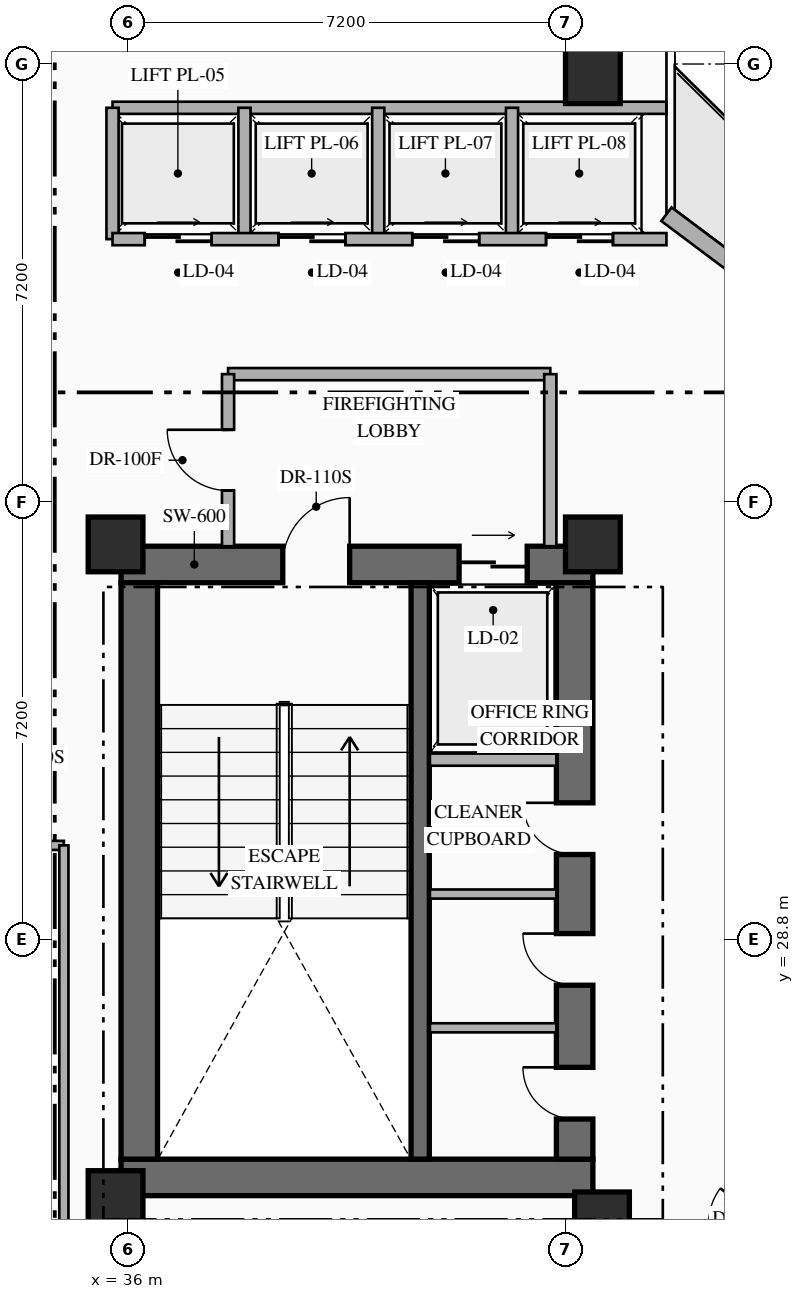
"""IFC4 building model, lengths in metres.
Left out: names, types, materials, properties, quantities, classifications, styles, units other than length and angle.
Written with IfcOpenShell. Run it as: python <this file> out.ifc"""

import sys

from ifc_helpers import new_model, si_unit, direction, frame, frame_2d, origin, origin_2d, place, context, subcontext, project, spatial, rectangle, extrude, element, fill, save


model = new_model("IFC4")
c1 = context("Model", 3, precision=1e-05, world=origin(), true_north=direction((0.0, 1.0)))
c2 = subcontext(c1, "Body", "Model", "MODEL_VIEW")
j1 = project(units=[si_unit("LENGTHUNIT", "METRE"), si_unit("PLANEANGLEUNIT", "RADIAN")], contexts=[c1])
p1 = place(None, origin())
s1 = spatial("IfcSite", under=j1, at=p1, CompositionType="ELEMENT")
p2 = place(p1, origin())
s2 = spatial("IfcBuilding", under=s1, at=p2, CompositionType="ELEMENT")
p3 = place(p2, frame((0.0, 0.0, 104.85)))
s3 = spatial("IfcBuildingStorey", under=s2, at=p3, CompositionType="ELEMENT", Elevation=104.85)
p4 = place(p3, frame((35.89, 24.89, 0.0), z_axis=(0.0, 0.0, 1.0), x_axis=(1.0, 0.0, 0.0)))
e1 = element("IfcWall", 1, at=p4, inside=s3, PredefinedType="SHEAR", context=c2, shape_type="SweptSolid", body=[
    extrude(rectangle(XDim=7.76, YDim=0.6, at=frame_2d((3.88, 0.0))), origin(), (0.0, 0.0, 1.0), 3.6),
])
p5 = place(p3, frame((35.89, 34.97, 0.0), z_axis=(0.0, 0.0, 1.0), x_axis=(1.0, 0.0, 0.0)))
e2 = element("IfcWall", 2, at=p5, inside=s3, PredefinedType="SHEAR", context=c2, shape_type="SweptSolid", body=[
    extrude(rectangle(XDim=7.76, YDim=0.6, at=frame_2d((3.88, 0.0))), origin(), (0.0, 0.0, 1.0), 3.6),
])
p6 = place(p5, frame((2.66, 0.0, 0.0)))
e3 = element("IfcOpeningElement", 3, at=p6, cuts=e2, PredefinedType="OPENING", context=c2, shape_type="SweptSolid", body=[
    extrude(rectangle(XDim=1.1, YDim=2.2, at=frame_2d((0.55, 1.1))), frame((0.0, 0.31, 0.0), z_axis=(0.0, -1.0, 0.0), x_axis=(1.0, 0.0, 0.0)), (0.0, 0.0, 1.0), 0.62),
])
p7 = place(p5, frame((5.56, 0.0, 0.0)))
e4 = element("IfcOpeningElement", 4, at=p7, cuts=e2, PredefinedType="OPENING", context=c2, shape_type="SweptSolid", body=[
    extrude(rectangle(XDim=1.12, YDim=2.15, at=frame_2d((0.56, 1.075))), frame((0.0, 0.31, 0.0), z_axis=(0.0, -1.0, 0.0), x_axis=(1.0, 0.0, 0.0)), (0.0, 0.0, 1.0), 0.62),
])
p8 = place(p3, frame((36.19, 25.19, 0.0), z_axis=(0.0, 0.0, 1.0), x_axis=(0.0, 1.0, 0.0)))
e5 = element("IfcWall", 5, at=p8, inside=s3, PredefinedType="SHEAR", context=c2, shape_type="SweptSolid", body=[
    extrude(rectangle(XDim=9.48, YDim=0.6, at=frame_2d((4.74, 0.0))), origin(), (0.0, 0.0, 1.0), 3.6),
])
p9 = place(p3, frame((43.35, 25.19, 0.0), z_axis=(0.0, 0.0, 1.0), x_axis=(0.0, 1.0, 0.0)))
e6 = element("IfcWall", 6, at=p9, inside=s3, PredefinedType="SHEAR", context=c2, shape_type="SweptSolid", body=[
    extrude(rectangle(XDim=9.48, YDim=0.6, at=frame_2d((4.74, 0.0))), origin(), (0.0, 0.0, 1.0), 3.6),
])
p10 = place(p9, frame((0.66, 0.0, 0.0)))
e7 = element("IfcOpeningElement", 7, at=p10, cuts=e6, PredefinedType="OPENING", context=c2, shape_type="SweptSolid", body=[
    extrude(rectangle(XDim=0.85, YDim=2.08, at=frame_2d((0.425, 1.04))), frame((0.0, 0.31, 0.0), z_axis=(0.0, -1.0, 0.0), x_axis=(1.0, 0.0, 0.0)), (0.0, 0.0, 1.0), 0.62),
])
p11 = place(p9, frame((2.86, 0.0, 0.0)))
e8 = element("IfcOpeningElement", 8, at=p11, cuts=e6, PredefinedType="OPENING", context=c2, shape_type="SweptSolid", body=[
    extrude(rectangle(XDim=0.85, YDim=2.08, at=frame_2d((0.425, 1.04))), frame((0.0, 0.31, 0.0), z_axis=(0.0, -1.0, 0.0), x_axis=(1.0, 0.0, 0.0)), (0.0, 0.0, 1.0), 0.62),
])
p12 = place(p9, frame((5.01, 0.0, 0.0)))
e9 = element("IfcOpeningElement", 9, at=p12, cuts=e6, PredefinedType="OPENING", context=c2, shape_type="SweptSolid", body=[
    extrude(rectangle(XDim=0.85, YDim=2.08, at=frame_2d((0.425, 1.04))), frame((0.0, 0.31, 0.0), z_axis=(0.0, -1.0, 0.0), x_axis=(1.0, 0.0, 0.0)), (0.0, 0.0, 1.0), 0.62),
])
p13 = place(p3, frame((40.81, 25.19, 0.0), z_axis=(0.0, 0.0, 1.0), x_axis=(0.0, 1.0, 0.0)))
e10 = element("IfcWall", 10, at=p13, inside=s3, PredefinedType="SHEAR", context=c2, shape_type="SweptSolid", body=[
    extrude(rectangle(XDim=9.48, YDim=0.3, at=frame_2d((4.74, 0.0))), origin(), (0.0, 0.0, 1.0), 3.6),
])
for number, where, z_axis, x_axis in (
    (11, (35.8, 24.55, 0.0), (0.0, 0.0, 1.0), (1.0, 0.0, 0.0)),
    (12, (43.8, 24.2, 0.0), (0.0, 0.0, 1.0), (1.0, 0.0, 0.0)),
    (13, (35.8, 35.3, 0.0), (0.0, 0.0, 1.0), (1.0, 0.0, 0.0)),
    (14, (43.65, 35.3, 0.0), (0.0, 0.0, 1.0), (1.0, 0.0, 0.0)),
    (15, (43.65, 43.0, 0.0), (0.0, 0.0, 1.0), (1.0, 0.0, 0.0)),
):
    element("IfcColumn", number, at=place(p3, frame(where, z_axis=z_axis, x_axis=x_axis)), inside=s3, PredefinedType="COLUMN", context=c2, shape_type="SweptSolid", body=[
        extrude(rectangle(XDim=0.9, YDim=0.9, at=origin_2d()), origin(), (0.0, 0.0, 1.0), 3.6),
    ])
p14 = place(p3, frame((44.86, 40.73, 0.0), z_axis=(0.0, 0.0, 1.0), x_axis=(0.800006902154, -0.599990797017, 0.0)))
e16 = element("IfcWall", 16, at=p14, inside=s3, PredefinedType="STANDARD", context=c2, shape_type="SweptSolid", body=[
    extrude(rectangle(XDim=29.712, YDim=0.28, at=frame_2d((14.856, 0.0))), origin(), (0.0, 0.0, 1.0), 3.35),
])
p15 = place(p14, frame((14.249, 0.0, 0.0)))
e17 = element("IfcOpeningElement", 17, at=p15, cuts=e16, PredefinedType="OPENING", context=c2, shape_type="SweptSolid", body=[
    extrude(rectangle(XDim=1.1, YDim=2.2, at=frame_2d((0.55, 1.1))), frame((0.0, 0.15, 0.0), z_axis=(0.0, -1.0, 0.0), x_axis=(1.0, 0.0, 0.0)), (0.0, 0.0, 1.0), 0.3),
])
p16 = place(p14, frame((6.528, 0.0, 0.85)))
e18 = element("IfcOpeningElement", 18, at=p16, cuts=e16, PredefinedType="OPENING", context=c2, shape_type="SweptSolid", body=[
    extrude(rectangle(XDim=1.8, YDim=2.1, at=frame_2d((0.9, 1.05))), frame((0.0, 0.15, 0.0), z_axis=(0.0, -1.0, 0.0), x_axis=(1.0, 0.0, 0.0)), (0.0, 0.0, 1.0), 0.3),
])
p17 = place(p14, frame((21.384, 0.0, 0.85)))
e19 = element("IfcOpeningElement", 19, at=p17, cuts=e16, PredefinedType="OPENING", context=c2, shape_type="SweptSolid", body=[
    extrude(rectangle(XDim=1.8, YDim=2.1, at=frame_2d((0.9, 1.05))), frame((0.0, 0.15, 0.0), z_axis=(0.0, -1.0, 0.0), x_axis=(1.0, 0.0, 0.0)), (0.0, 0.0, 1.0), 0.3),
])
p18 = place(p3, frame((40.97, 31.76, 0.0), z_axis=(0.0, 0.0, 1.0), x_axis=(1.0, 0.0, 0.0)))
e20 = element("IfcWall", 20, at=p18, inside=s3, PredefinedType="STANDARD", context=c2, shape_type="SweptSolid", body=[
    extrude(rectangle(XDim=2.08, YDim=0.2, at=frame_2d((1.04, 0.0))), origin(), (0.0, 0.0, 1.0), 3.35),
])
for number, where, z_axis, x_axis in (
    (21, (40.97, 27.35, 0.0), (0.0, 0.0, 1.0), (1.0, 0.0, 0.0)),
    (22, (40.97, 29.55, 0.0), (0.0, 0.0, 1.0), (1.0, 0.0, 0.0)),
):
    element("IfcWall", number, at=place(p3, frame(where, z_axis=z_axis, x_axis=x_axis)), inside=s3, PredefinedType="PARTITIONING", context=c2, shape_type="SweptSolid", body=[
        extrude(rectangle(XDim=2.08, YDim=0.15, at=frame_2d((1.04, 0.0))), origin(), (0.0, 0.0, 1.0), 3.35),
    ])
p19 = place(p3, frame((37.65, 38.1, 0.0), z_axis=(0.0, 0.0, 1.0), x_axis=(1.0, 0.0, 0.0)))
e23 = element("IfcWall", 23, at=p19, inside=s3, PredefinedType="STANDARD", context=c2, shape_type="SweptSolid", body=[
    extrude(rectangle(XDim=5.3, YDim=0.2, at=frame_2d((2.65, 0.0))), origin(), (0.0, 0.0, 1.0), 3.35),
])
p20 = place(p3, frame((42.95, 35.27, 0.0), z_axis=(0.0, 0.0, 1.0), x_axis=(0.0, 1.0, 0.0)))
e24 = element("IfcWall", 24, at=p20, inside=s3, PredefinedType="STANDARD", context=c2, shape_type="SweptSolid", body=[
    extrude(rectangle(XDim=2.83, YDim=0.2, at=frame_2d((1.415, 0.0))), origin(), (0.0, 0.0, 1.0), 3.35),
])
p21 = place(p3, frame((37.65, 35.27, 0.0), z_axis=(0.0, 0.0, 1.0), x_axis=(0.0, 1.0, 0.0)))
e25 = element("IfcWall", 25, at=p21, inside=s3, PredefinedType="STANDARD", context=c2, shape_type="SweptSolid", body=[
    extrude(rectangle(XDim=2.83, YDim=0.2, at=frame_2d((1.415, 0.0))), origin(), (0.0, 0.0, 1.0), 3.35),
])
p22 = place(p21, frame((0.915, 0.0, 0.0)))
e26 = element("IfcOpeningElement", 26, at=p22, cuts=e25, PredefinedType="OPENING", context=c2, shape_type="SweptSolid", body=[
    extrude(rectangle(XDim=1.0, YDim=2.2, at=frame_2d((0.5, 1.1))), frame((0.0, 0.11, 0.0), z_axis=(0.0, -1.0, 0.0), x_axis=(1.0, 0.0, 0.0)), (0.0, 0.0, 1.0), 0.22),
])
p23 = place(p3, frame((35.75, 42.48, 0.0), z_axis=(0.0, 0.0, 1.0), x_axis=(1.0, 0.0, 0.0)))
e27 = element("IfcWall", 27, at=p23, inside=s3, PredefinedType="STANDARD", context=c2, shape_type="SweptSolid", body=[
    extrude(rectangle(XDim=9.11, YDim=0.2, at=frame_2d((4.555, 0.0))), origin(), (0.0, 0.0, 1.0), 3.35),
])
for number, where, z_axis, x_axis in (
    (28, (35.75, 40.32, 0.0), (0.0, 0.0, 1.0), (0.0, 1.0, 0.0)),
    (29, (37.92, 40.32, 0.0), (0.0, 0.0, 1.0), (0.0, 1.0, 0.0)),
    (30, (40.12, 40.32, 0.0), (0.0, 0.0, 1.0), (0.0, 1.0, 0.0)),
    (31, (42.32, 40.32, 0.0), (0.0, 0.0, 1.0), (0.0, 1.0, 0.0)),
):
    element("IfcWall", number, at=place(p3, frame(where, z_axis=z_axis, x_axis=x_axis)), inside=s3, PredefinedType="STANDARD", context=c2, shape_type="SweptSolid", body=[
        extrude(rectangle(XDim=2.16, YDim=0.2, at=frame_2d((1.08, 0.0))), origin(), (0.0, 0.0, 1.0), 3.35),
    ])
p24 = place(p3, frame((35.75, 40.32, 0.0), z_axis=(0.0, 0.0, 1.0), x_axis=(1.0, 0.0, 0.0)))
e32 = element("IfcWall", 32, at=p24, inside=s3, PredefinedType="STANDARD", context=c2, shape_type="SweptSolid", body=[
    extrude(rectangle(XDim=9.11, YDim=0.2, at=frame_2d((4.555, 0.0))), origin(), (0.0, 0.0, 1.0), 3.35),
])
p25 = place(p24, frame((0.53, 0.0, 0.0)))
e33 = element("IfcOpeningElement", 33, at=p25, cuts=e32, PredefinedType="OPENING", context=c2, shape_type="SweptSolid", body=[
    extrude(rectangle(XDim=1.1, YDim=2.18, at=frame_2d((0.55, 1.09))), frame((0.0, 0.11, 0.0), z_axis=(0.0, -1.0, 0.0), x_axis=(1.0, 0.0, 0.0)), (0.0, 0.0, 1.0), 0.22),
])
p26 = place(p24, frame((2.73, 0.0, 0.0)))
e34 = element("IfcOpeningElement", 34, at=p26, cuts=e32, PredefinedType="OPENING", context=c2, shape_type="SweptSolid", body=[
    extrude(rectangle(XDim=1.1, YDim=2.18, at=frame_2d((0.55, 1.09))), frame((0.0, 0.11, 0.0), z_axis=(0.0, -1.0, 0.0), x_axis=(1.0, 0.0, 0.0)), (0.0, 0.0, 1.0), 0.22),
])
p27 = place(p24, frame((4.93, 0.0, 0.0)))
e35 = element("IfcOpeningElement", 35, at=p27, cuts=e32, PredefinedType="OPENING", context=c2, shape_type="SweptSolid", body=[
    extrude(rectangle(XDim=1.1, YDim=2.18, at=frame_2d((0.55, 1.09))), frame((0.0, 0.11, 0.0), z_axis=(0.0, -1.0, 0.0), x_axis=(1.0, 0.0, 0.0)), (0.0, 0.0, 1.0), 0.22),
])
p28 = place(p24, frame((7.13, 0.0, 0.0)))
e36 = element("IfcOpeningElement", 36, at=p28, cuts=e32, PredefinedType="OPENING", context=c2, shape_type="SweptSolid", body=[
    extrude(rectangle(XDim=1.1, YDim=2.18, at=frame_2d((0.55, 1.09))), frame((0.0, 0.11, 0.0), z_axis=(0.0, -1.0, 0.0), x_axis=(1.0, 0.0, 0.0)), (0.0, 0.0, 1.0), 0.22),
])
p29 = place(p3, frame((25.55, 30.35, 0.0), z_axis=(0.0, 0.0, 1.0), x_axis=(1.0, 0.0, 0.0)))
e37 = element("IfcWall", 37, at=p29, inside=s3, PredefinedType="PARTITIONING", context=c2, shape_type="SweptSolid", body=[
    extrude(rectangle(XDim=9.4, YDim=0.15, at=frame_2d((4.7, 0.0))), origin(), (0.0, 0.0, 1.0), 3.35),
])
p30 = place(p29, frame((7.638, 0.0, 0.0)))
e38 = element("IfcOpeningElement", 38, at=p30, cuts=e37, PredefinedType="OPENING", context=c2, shape_type="SweptSolid", body=[
    extrude(rectangle(XDim=1.0, YDim=2.15, at=frame_2d((0.5, 1.075))), frame((0.0, 0.085, 0.0), z_axis=(0.0, -1.0, 0.0), x_axis=(1.0, 0.0, 0.0)), (0.0, 0.0, 1.0), 0.17),
])
p31 = place(p3, frame((34.95, 23.2, 0.0), z_axis=(0.0, 0.0, 1.0), x_axis=(0.0, 1.0, 0.0)))
e39 = element("IfcWall", 39, at=p31, inside=s3, PredefinedType="PARTITIONING", context=c2, shape_type="SweptSolid", body=[
    extrude(rectangle(XDim=7.15, YDim=0.15, at=frame_2d((3.575, 0.0))), origin(), (0.0, 0.0, 1.0), 3.35),
])
p32 = place(p3, frame((38.504, 13.472, 0.0), z_axis=(0.0, 0.0, 1.0), x_axis=(0.6, 0.8, 0.0)))
e40 = element("IfcWall", 40, at=p32, inside=s3, PredefinedType="PARTITIONING", context=c2, shape_type="SweptSolid", body=[
    extrude(rectangle(XDim=25.72, YDim=0.15, at=frame_2d((12.86, 0.0))), origin(), (0.0, 0.0, 1.0), 3.35),
])
p33 = place(p32, frame((12.385, 0.0, 0.0)))
e41 = element("IfcOpeningElement", 41, at=p33, cuts=e40, PredefinedType="OPENING", context=c2, shape_type="SweptSolid", body=[
    extrude(rectangle(XDim=0.95, YDim=2.15, at=frame_2d((0.475, 1.075))), frame((0.0, 0.085, 0.0), z_axis=(0.0, -1.0, 0.0), x_axis=(1.0, 0.0, 0.0)), (0.0, 0.0, 1.0), 0.17),
])
p34 = place(p6, origin())
e42 = element("IfcDoor", 42, at=p34, inside=s3, OperationType="SINGLE_SWING_RIGHT", PredefinedType="DOOR", context=c2, shape_type="SweptSolid", body=[
    extrude(rectangle(XDim=1.1, YDim=2.2, at=frame_2d((0.55, 1.1))), frame((0.0, 0.025, 0.0), z_axis=(0.0, -1.0, 0.0), x_axis=(1.0, 0.0, 0.0)), (0.0, 0.0, 1.0), 0.05),
])
fill(e3, e42)
p35 = place(p7, origin())
e43 = element("IfcDoor", 43, at=p35, inside=s3, OperationType="SLIDING_TO_RIGHT", PredefinedType="USERDEFINED", context=c2, shape_type="SweptSolid", body=[
    extrude(rectangle(XDim=1.12, YDim=2.15, at=frame_2d((0.56, 1.075))), frame((0.0, 0.025, 0.0), z_axis=(0.0, -1.0, 0.0), x_axis=(1.0, 0.0, 0.0)), (0.0, 0.0, 1.0), 0.05),
])
fill(e4, e43)
p36 = place(p10, origin())
e44 = element("IfcDoor", 44, at=p36, inside=s3, OperationType="SINGLE_SWING_RIGHT", PredefinedType="DOOR", context=c2, shape_type="SweptSolid", body=[
    extrude(rectangle(XDim=0.85, YDim=2.08, at=frame_2d((0.425, 1.04))), frame((0.0, 0.025, 0.0), z_axis=(0.0, -1.0, 0.0), x_axis=(1.0, 0.0, 0.0)), (0.0, 0.0, 1.0), 0.05),
])
fill(e7, e44)
p37 = place(p11, origin())
e45 = element("IfcDoor", 45, at=p37, inside=s3, OperationType="SINGLE_SWING_RIGHT", PredefinedType="DOOR", context=c2, shape_type="SweptSolid", body=[
    extrude(rectangle(XDim=0.85, YDim=2.08, at=frame_2d((0.425, 1.04))), frame((0.0, 0.025, 0.0), z_axis=(0.0, -1.0, 0.0), x_axis=(1.0, 0.0, 0.0)), (0.0, 0.0, 1.0), 0.05),
])
fill(e8, e45)
p38 = place(p12, origin())
e46 = element("IfcDoor", 46, at=p38, inside=s3, OperationType="SINGLE_SWING_RIGHT", PredefinedType="DOOR", context=c2, shape_type="SweptSolid", body=[
    extrude(rectangle(XDim=0.85, YDim=2.08, at=frame_2d((0.425, 1.04))), frame((0.0, 0.025, 0.0), z_axis=(0.0, -1.0, 0.0), x_axis=(1.0, 0.0, 0.0)), (0.0, 0.0, 1.0), 0.05),
])
fill(e9, e46)
p39 = place(p22, origin())
e47 = element("IfcDoor", 47, at=p39, inside=s3, OperationType="SINGLE_SWING_RIGHT", PredefinedType="DOOR", context=c2, shape_type="SweptSolid", body=[
    extrude(rectangle(XDim=1.0, YDim=2.2, at=frame_2d((0.5, 1.1))), frame((0.0, 0.025, 0.0), z_axis=(0.0, -1.0, 0.0), x_axis=(1.0, 0.0, 0.0)), (0.0, 0.0, 1.0), 0.05),
])
fill(e26, e47)
p40 = place(p25, origin())
e48 = element("IfcDoor", 48, at=p40, inside=s3, OperationType="SLIDING_TO_RIGHT", PredefinedType="USERDEFINED", context=c2, shape_type="SweptSolid", body=[
    extrude(rectangle(XDim=1.1, YDim=2.18, at=frame_2d((0.55, 1.09))), frame((0.0, 0.025, 0.0), z_axis=(0.0, -1.0, 0.0), x_axis=(1.0, 0.0, 0.0)), (0.0, 0.0, 1.0), 0.05),
])
fill(e33, e48)
p41 = place(p26, origin())
e49 = element("IfcDoor", 49, at=p41, inside=s3, OperationType="SLIDING_TO_RIGHT", PredefinedType="USERDEFINED", context=c2, shape_type="SweptSolid", body=[
    extrude(rectangle(XDim=1.1, YDim=2.18, at=frame_2d((0.55, 1.09))), frame((0.0, 0.025, 0.0), z_axis=(0.0, -1.0, 0.0), x_axis=(1.0, 0.0, 0.0)), (0.0, 0.0, 1.0), 0.05),
])
fill(e34, e49)
p42 = place(p27, origin())
e50 = element("IfcDoor", 50, at=p42, inside=s3, OperationType="SLIDING_TO_RIGHT", PredefinedType="USERDEFINED", context=c2, shape_type="SweptSolid", body=[
    extrude(rectangle(XDim=1.1, YDim=2.18, at=frame_2d((0.55, 1.09))), frame((0.0, 0.025, 0.0), z_axis=(0.0, -1.0, 0.0), x_axis=(1.0, 0.0, 0.0)), (0.0, 0.0, 1.0), 0.05),
])
fill(e35, e50)
p43 = place(p28, origin())
e51 = element("IfcDoor", 51, at=p43, inside=s3, OperationType="SLIDING_TO_RIGHT", PredefinedType="USERDEFINED", context=c2, shape_type="SweptSolid", body=[
    extrude(rectangle(XDim=1.1, YDim=2.18, at=frame_2d((0.55, 1.09))), frame((0.0, 0.025, 0.0), z_axis=(0.0, -1.0, 0.0), x_axis=(1.0, 0.0, 0.0)), (0.0, 0.0, 1.0), 0.05),
])
fill(e36, e51)
save(model, sys.argv[1])
